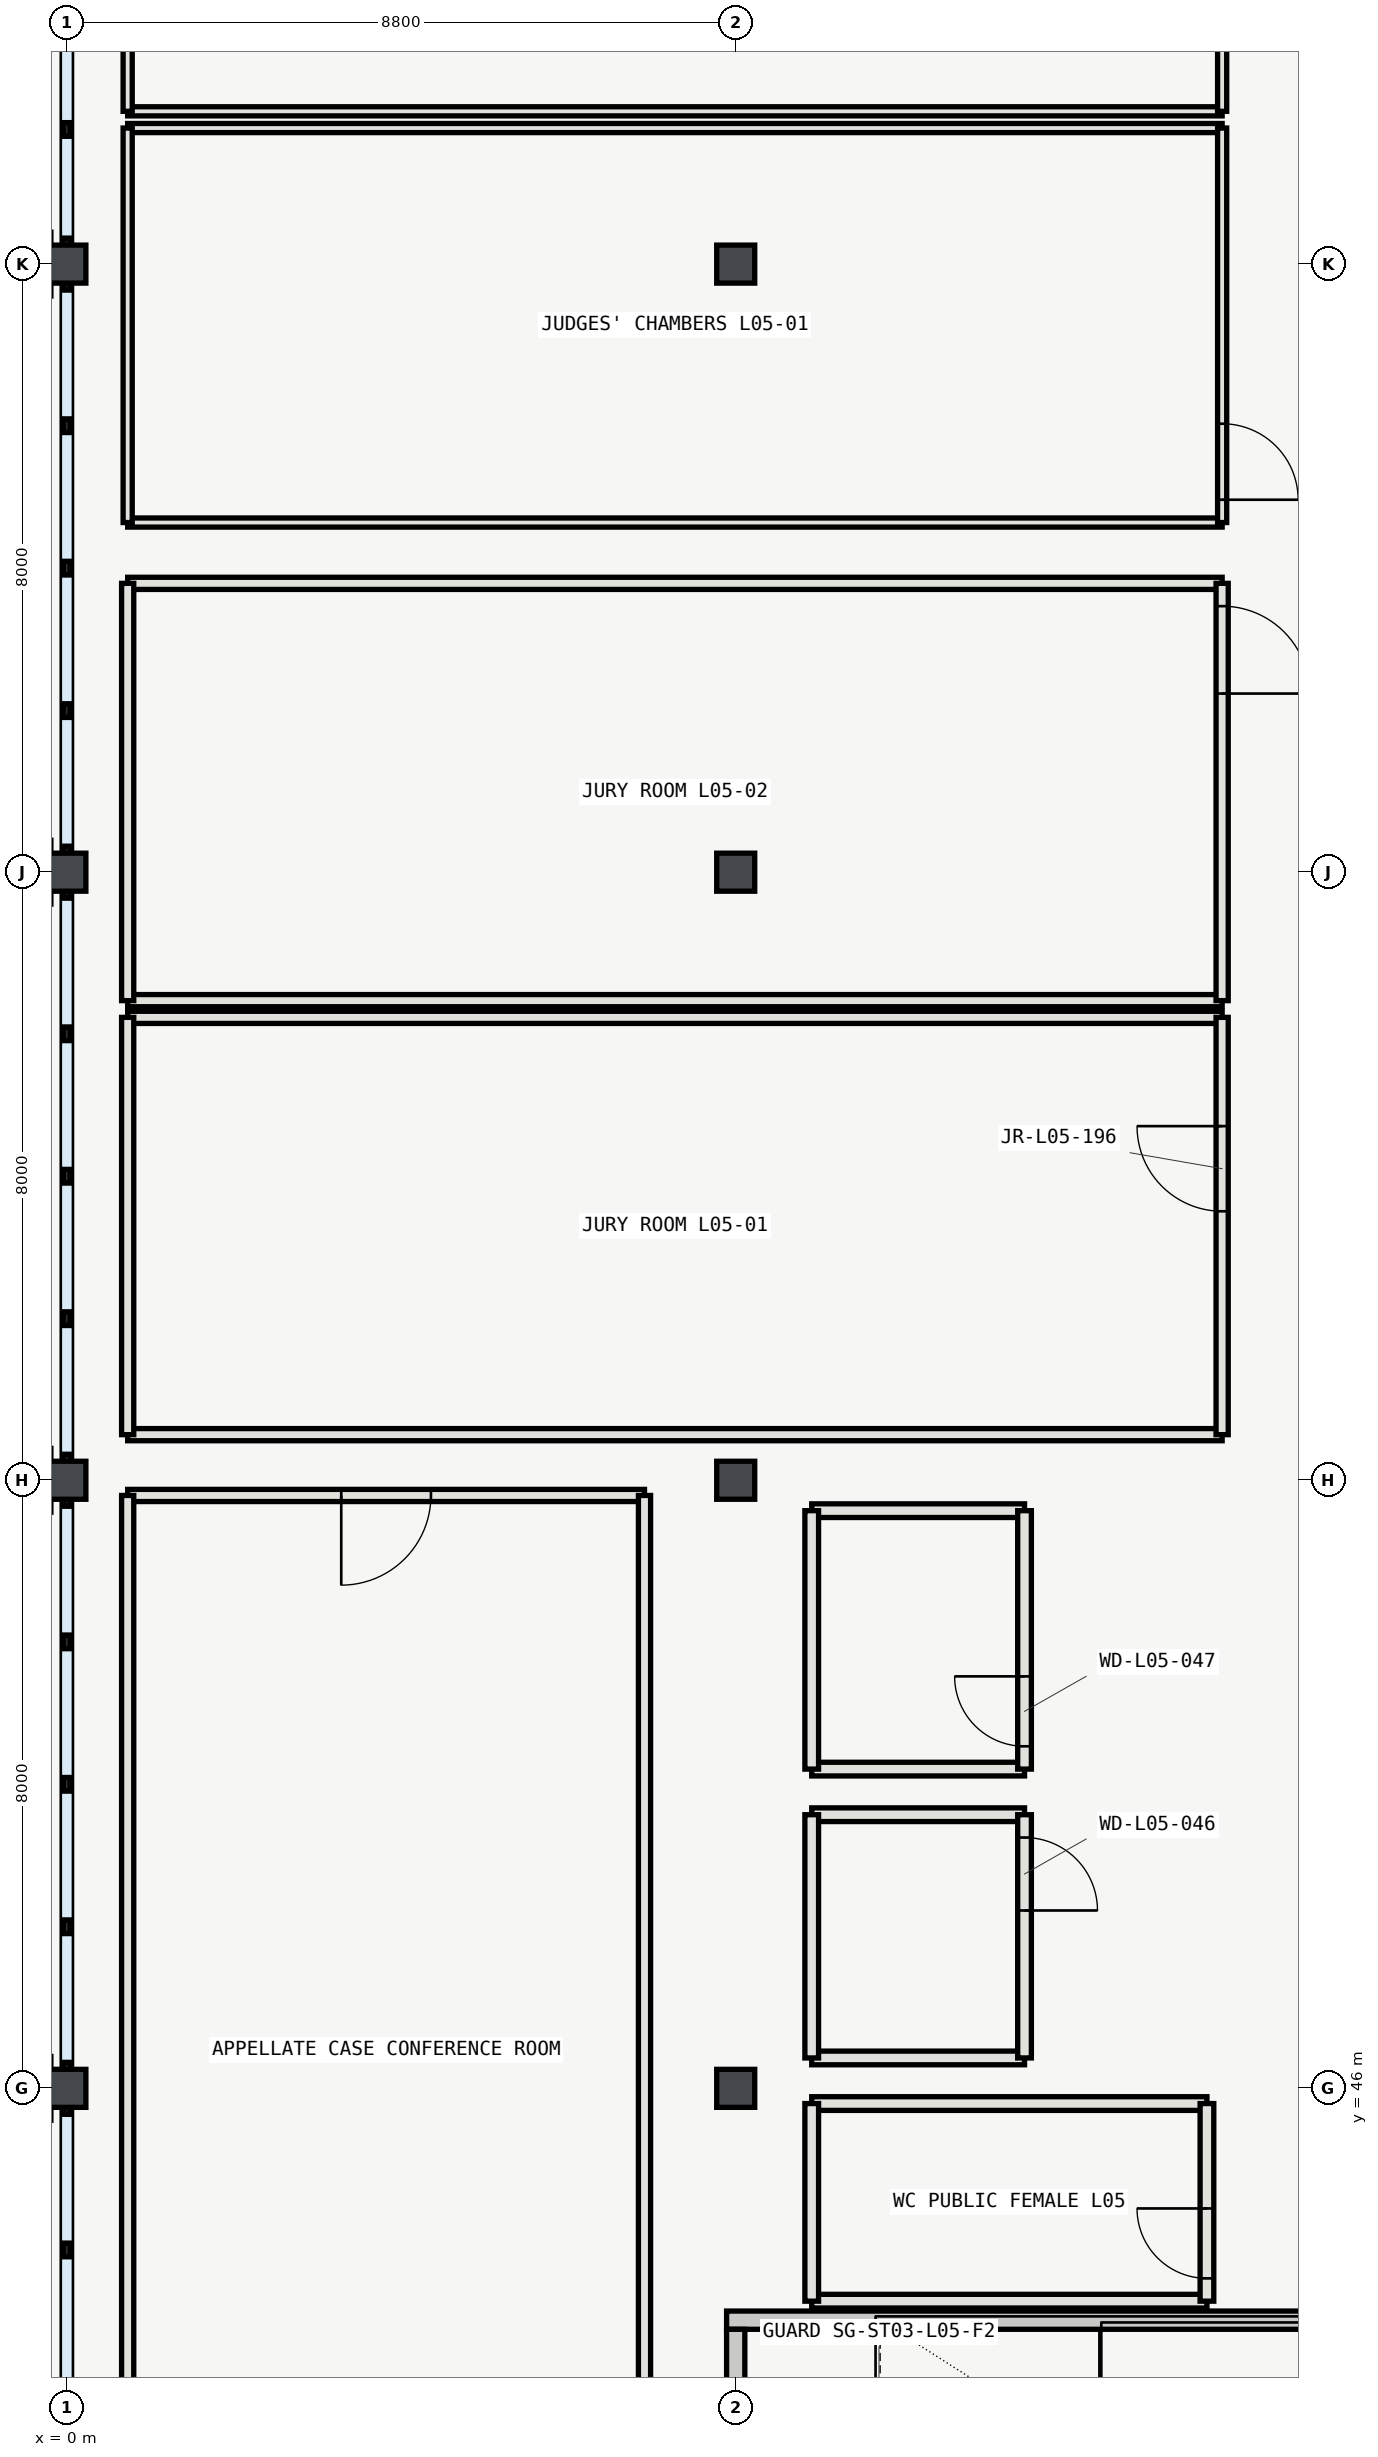
"""IFC4 building model, lengths in metres.
Left out: names, types, materials, properties, quantities, classifications, styles, units other than length and angle.
Written with IfcOpenShell. Run it as: python <this file> out.ifc"""

import sys

from ifc_helpers import new_model, si_unit, direction, frame, frame_2d, origin, origin_2d, place, context, subcontext, project, spatial, rectangle, hollow_rectangle, extrude, element, fill, save


model = new_model("IFC4")
c1 = context("Model", 3, precision=1e-05, world=origin(), true_north=direction((0.0, 1.0)))
c2 = subcontext(c1, "Body", "Model", "MODEL_VIEW")
j1 = project(units=[si_unit("LENGTHUNIT", "METRE"), si_unit("PLANEANGLEUNIT", "RADIAN")], contexts=[c1])
p1 = place(None, origin())
s1 = spatial("IfcSite", under=j1, at=p1, CompositionType="ELEMENT")
p2 = place(p1, origin())
s2 = spatial("IfcBuilding", under=s1, at=p2, CompositionType="ELEMENT")
p3 = place(p2, frame((0.0, 0.0, 24.6)))
s3 = spatial("IfcBuildingStorey", under=s2, at=p3, CompositionType="ELEMENT", Elevation=24.6)
for number, where, z_axis, x_axis in (
    (1, (0.0, 46.0, 0.0), (0.0, 0.0, 1.0), (1.0, 0.0, 0.0)),
    (2, (0.0, 54.0, 0.0), (0.0, 0.0, 1.0), (1.0, 0.0, 0.0)),
    (3, (0.0, 62.0, 0.0), (0.0, 0.0, 1.0), (1.0, 0.0, 0.0)),
    (4, (0.0, 70.0, 0.0), (0.0, 0.0, 1.0), (1.0, 0.0, 0.0)),
    (5, (8.8, 46.0, 0.0), (0.0, 0.0, 1.0), (1.0, 0.0, 0.0)),
    (6, (8.8, 54.0, 0.0), (0.0, 0.0, 1.0), (1.0, 0.0, 0.0)),
    (7, (8.8, 62.0, 0.0), (0.0, 0.0, 1.0), (1.0, 0.0, 0.0)),
    (8, (8.8, 70.0, 0.0), (0.0, 0.0, 1.0), (1.0, 0.0, 0.0)),
):
    element("IfcColumn", number, at=place(p3, frame(where, z_axis=z_axis, x_axis=x_axis)), inside=s3, PredefinedType="COLUMN", context=c2, shape_type="SweptSolid", body=[
        extrude(hollow_rectangle(XDim=0.5, YDim=0.5, WallThickness=0.02, InnerFilletRadius=0.02, OuterFilletRadius=0.04, at=origin_2d()), origin(), (0.0, 0.0, 1.0), 4.2),
    ])
for number, where, z_axis, x_axis in (
    (9, (9.8, 46.4, 0.0), (0.0, 0.0, 1.0), (1.0, 0.0, 0.0)),
    (10, (12.6, 49.6, 0.0), (0.0, 0.0, 1.0), (-1.0, 0.0, 0.0)),
):
    element("IfcWall", number, at=place(p3, frame(where, z_axis=z_axis, x_axis=x_axis)), inside=s3, PredefinedType="PLUMBINGWALL", context=c2, shape_type="SweptSolid", body=[
        extrude(rectangle(XDim=2.8, YDim=0.18, at=frame_2d((1.4, 0.0))), origin(), (0.0, 0.0, 1.0), 3.92),
    ])
p4 = place(p3, frame((9.8, 49.6, 0.0), z_axis=(0.0, 0.0, 1.0), x_axis=(0.0, -1.0, 0.0)))
e11 = element("IfcWall", 11, at=p4, inside=s3, PredefinedType="PLUMBINGWALL", context=c2, shape_type="SweptSolid", body=[
    extrude(rectangle(XDim=3.2, YDim=0.18, at=frame_2d((1.6, 0.0))), origin(), (0.0, 0.0, 1.0), 3.92),
])
p5 = place(p3, frame((12.6, 46.4, 0.0), z_axis=(0.0, 0.0, 1.0), x_axis=(0.0, 1.0, 0.0)))
e12 = element("IfcWall", 12, at=p5, inside=s3, PredefinedType="PLUMBINGWALL", context=c2, shape_type="SweptSolid", body=[
    extrude(rectangle(XDim=3.2, YDim=0.18, at=frame_2d((1.6, 0.0))), origin(), (0.0, 0.0, 1.0), 3.92),
])
p6 = place(p5, frame((1.94, 0.0, 0.0)))
e13 = element("IfcOpeningElement", 13, at=p6, cuts=e12, PredefinedType="OPENING", context=c2, shape_type="SweptSolid", body=[
    extrude(rectangle(XDim=0.96, YDim=2.1, at=frame_2d((0.48, 1.05))), frame((0.0, 0.1, 0.0), z_axis=(0.0, -1.0, 0.0), x_axis=(1.0, 0.0, 0.0)), (0.0, 0.0, 1.0), 0.2),
])
for number, where, z_axis, x_axis in (
    (14, (9.8, 50.2, 0.0), (0.0, 0.0, 1.0), (1.0, 0.0, 0.0)),
    (15, (12.6, 53.6, 0.0), (0.0, 0.0, 1.0), (-1.0, 0.0, 0.0)),
):
    element("IfcWall", number, at=place(p3, frame(where, z_axis=z_axis, x_axis=x_axis)), inside=s3, PredefinedType="PLUMBINGWALL", context=c2, shape_type="SweptSolid", body=[
        extrude(rectangle(XDim=2.8, YDim=0.18, at=frame_2d((1.4, 0.0))), origin(), (0.0, 0.0, 1.0), 3.92),
    ])
p7 = place(p3, frame((9.8, 53.6, 0.0), z_axis=(0.0, 0.0, 1.0), x_axis=(0.0, -1.0, 0.0)))
e16 = element("IfcWall", 16, at=p7, inside=s3, PredefinedType="PLUMBINGWALL", context=c2, shape_type="SweptSolid", body=[
    extrude(rectangle(XDim=3.4, YDim=0.18, at=frame_2d((1.7, 0.0))), origin(), (0.0, 0.0, 1.0), 3.92),
])
p8 = place(p3, frame((12.6, 50.2, 0.0), z_axis=(0.0, 0.0, 1.0), x_axis=(0.0, 1.0, 0.0)))
e17 = element("IfcWall", 17, at=p8, inside=s3, PredefinedType="PLUMBINGWALL", context=c2, shape_type="SweptSolid", body=[
    extrude(rectangle(XDim=3.4, YDim=0.18, at=frame_2d((1.7, 0.0))), origin(), (0.0, 0.0, 1.0), 3.92),
])
p9 = place(p8, frame((0.3, 0.0, 0.0)))
e18 = element("IfcOpeningElement", 18, at=p9, cuts=e17, PredefinedType="OPENING", context=c2, shape_type="SweptSolid", body=[
    extrude(rectangle(XDim=0.92, YDim=2.1, at=frame_2d((0.46, 1.05))), frame((0.0, 0.1, 0.0), z_axis=(0.0, -1.0, 0.0), x_axis=(1.0, 0.0, 0.0)), (0.0, 0.0, 1.0), 0.2),
])
p10 = place(p3, frame((9.8, 43.2, 0.0), z_axis=(0.0, 0.0, 1.0), x_axis=(1.0, 0.0, 0.0)))
e19 = element("IfcWall", 19, at=p10, inside=s3, PredefinedType="PLUMBINGWALL", context=c2, shape_type="SweptSolid", body=[
    extrude(rectangle(XDim=5.2, YDim=0.18, at=frame_2d((2.6, 0.0))), origin(), (0.0, 0.0, 1.0), 3.92),
])
p11 = place(p3, frame((15.0, 45.8, 0.0), z_axis=(0.0, 0.0, 1.0), x_axis=(-1.0, 0.0, 0.0)))
e20 = element("IfcWall", 20, at=p11, inside=s3, PredefinedType="PLUMBINGWALL", context=c2, shape_type="SweptSolid", body=[
    extrude(rectangle(XDim=5.2, YDim=0.18, at=frame_2d((2.6, 0.0))), origin(), (0.0, 0.0, 1.0), 3.636),
])
p12 = place(p3, frame((9.8, 45.8, 0.0), z_axis=(0.0, 0.0, 1.0), x_axis=(0.0, -1.0, 0.0)))
e21 = element("IfcWall", 21, at=p12, inside=s3, PredefinedType="PLUMBINGWALL", context=c2, shape_type="SweptSolid", body=[
    extrude(rectangle(XDim=2.6, YDim=0.18, at=frame_2d((1.3, 0.0))), origin(), (0.0, 0.0, 1.0), 3.92),
])
p13 = place(p3, frame((15.0, 43.2, 0.0), z_axis=(0.0, 0.0, 1.0), x_axis=(0.0, 1.0, 0.0)))
e22 = element("IfcWall", 22, at=p13, inside=s3, PredefinedType="PLUMBINGWALL", context=c2, shape_type="SweptSolid", body=[
    extrude(rectangle(XDim=2.6, YDim=0.18, at=frame_2d((1.3, 0.0))), origin(), (0.0, 0.0, 1.0), 3.92),
])
p14 = place(p13, frame((0.3, 0.0, 0.0)))
e23 = element("IfcOpeningElement", 23, at=p14, cuts=e22, PredefinedType="OPENING", context=c2, shape_type="SweptSolid", body=[
    extrude(rectangle(XDim=0.92, YDim=2.1, at=frame_2d((0.46, 1.05))), frame((0.0, 0.1, 0.0), z_axis=(0.0, -1.0, 0.0), x_axis=(1.0, 0.0, 0.0)), (0.0, 0.0, 1.0), 0.2),
])
for number, where, z_axis, x_axis in (
    (24, (0.8, 54.6, 0.0), (0.0, 0.0, 1.0), (1.0, 0.0, 0.0)),
    (25, (15.2, 60.09, 0.0), (0.0, 0.0, 1.0), (-1.0, 0.0, 0.0)),
):
    element("IfcWall", number, at=place(p3, frame(where, z_axis=z_axis, x_axis=x_axis)), inside=s3, PredefinedType="PARTITIONING", context=c2, shape_type="SweptSolid", body=[
        extrude(rectangle(XDim=14.4, YDim=0.16, at=frame_2d((7.2, 0.0))), origin(), (0.0, 0.0, 1.0), 3.92),
    ])
p15 = place(p3, frame((0.8, 60.09, 0.0), z_axis=(0.0, 0.0, 1.0), x_axis=(0.0, -1.0, 0.0)))
e26 = element("IfcWall", 26, at=p15, inside=s3, PredefinedType="PARTITIONING", context=c2, shape_type="SweptSolid", body=[
    extrude(rectangle(XDim=5.49, YDim=0.16, at=frame_2d((2.745, 0.0))), origin(), (0.0, 0.0, 1.0), 3.92),
])
p16 = place(p3, frame((15.2, 54.6, 0.0), z_axis=(0.0, 0.0, 1.0), x_axis=(0.0, 1.0, 0.0)))
e27 = element("IfcWall", 27, at=p16, inside=s3, PredefinedType="PARTITIONING", context=c2, shape_type="SweptSolid", body=[
    extrude(rectangle(XDim=5.49, YDim=0.16, at=frame_2d((2.745, 0.0))), origin(), (0.0, 0.0, 1.0), 3.92),
])
p17 = place(p16, frame((2.939, 0.0, 0.0)))
e28 = element("IfcOpeningElement", 28, at=p17, cuts=e27, PredefinedType="OPENING", context=c2, shape_type="SweptSolid", body=[
    extrude(rectangle(XDim=1.12, YDim=2.2, at=frame_2d((0.56, 1.1))), frame((0.0, 0.09, 0.0), z_axis=(0.0, -1.0, 0.0), x_axis=(1.0, 0.0, 0.0)), (0.0, 0.0, 1.0), 0.18),
])
for number, where, z_axis, x_axis in (
    (29, (0.8, 60.31, 0.0), (0.0, 0.0, 1.0), (1.0, 0.0, 0.0)),
    (30, (15.2, 65.8, 0.0), (0.0, 0.0, 1.0), (-1.0, 0.0, 0.0)),
):
    element("IfcWall", number, at=place(p3, frame(where, z_axis=z_axis, x_axis=x_axis)), inside=s3, PredefinedType="PARTITIONING", context=c2, shape_type="SweptSolid", body=[
        extrude(rectangle(XDim=14.4, YDim=0.16, at=frame_2d((7.2, 0.0))), origin(), (0.0, 0.0, 1.0), 3.92),
    ])
p18 = place(p3, frame((0.8, 65.8, 0.0), z_axis=(0.0, 0.0, 1.0), x_axis=(0.0, -1.0, 0.0)))
e31 = element("IfcWall", 31, at=p18, inside=s3, PredefinedType="PARTITIONING", context=c2, shape_type="SweptSolid", body=[
    extrude(rectangle(XDim=5.49, YDim=0.16, at=frame_2d((2.745, 0.0))), origin(), (0.0, 0.0, 1.0), 3.92),
])
p19 = place(p3, frame((15.2, 60.31, 0.0), z_axis=(0.0, 0.0, 1.0), x_axis=(0.0, 1.0, 0.0)))
e32 = element("IfcWall", 32, at=p19, inside=s3, PredefinedType="PARTITIONING", context=c2, shape_type="SweptSolid", body=[
    extrude(rectangle(XDim=5.49, YDim=0.16, at=frame_2d((2.745, 0.0))), origin(), (0.0, 0.0, 1.0), 3.92),
])
p20 = place(p19, frame((4.04, 0.0, 0.0)))
e33 = element("IfcOpeningElement", 33, at=p20, cuts=e32, PredefinedType="OPENING", context=c2, shape_type="SweptSolid", body=[
    extrude(rectangle(XDim=1.15, YDim=2.2, at=frame_2d((0.575, 1.1))), frame((0.0, 0.09, 0.0), z_axis=(0.0, -1.0, 0.0), x_axis=(1.0, 0.0, 0.0)), (0.0, 0.0, 1.0), 0.18),
])
for number, where, z_axis, x_axis in (
    (34, (0.8, 66.6, 0.0), (0.0, 0.0, 1.0), (1.0, 0.0, 0.0)),
    (35, (15.2, 71.79, 0.0), (0.0, 0.0, 1.0), (-1.0, 0.0, 0.0)),
):
    element("IfcWall", number, at=place(p3, frame(where, z_axis=z_axis, x_axis=x_axis)), inside=s3, PredefinedType="PARTITIONING", context=c2, shape_type="SweptSolid", body=[
        extrude(rectangle(XDim=14.4, YDim=0.12, at=frame_2d((7.2, 0.0))), origin(), (0.0, 0.0, 1.0), 3.92),
    ])
p21 = place(p3, frame((0.8, 71.79, 0.0), z_axis=(0.0, 0.0, 1.0), x_axis=(0.0, -1.0, 0.0)))
e36 = element("IfcWall", 36, at=p21, inside=s3, PredefinedType="PARTITIONING", context=c2, shape_type="SweptSolid", body=[
    extrude(rectangle(XDim=5.19, YDim=0.12, at=frame_2d((2.595, 0.0))), origin(), (0.0, 0.0, 1.0), 3.92),
])
p22 = place(p3, frame((15.2, 66.6, 0.0), z_axis=(0.0, 0.0, 1.0), x_axis=(0.0, 1.0, 0.0)))
e37 = element("IfcWall", 37, at=p22, inside=s3, PredefinedType="PARTITIONING", context=c2, shape_type="SweptSolid", body=[
    extrude(rectangle(XDim=5.19, YDim=0.12, at=frame_2d((2.595, 0.0))), origin(), (0.0, 0.0, 1.0), 3.92),
])
p23 = place(p22, frame((0.3, 0.0, 0.0)))
e38 = element("IfcOpeningElement", 38, at=p23, cuts=e37, PredefinedType="OPENING", context=c2, shape_type="SweptSolid", body=[
    extrude(rectangle(XDim=1.0, YDim=2.15, at=frame_2d((0.5, 1.075))), frame((0.0, 0.07, 0.0), z_axis=(0.0, -1.0, 0.0), x_axis=(1.0, 0.0, 0.0)), (0.0, 0.0, 1.0), 0.14),
])
p24 = place(p3, frame((0.8, 72.01, 0.0), z_axis=(0.0, 0.0, 1.0), x_axis=(1.0, 0.0, 0.0)))
e39 = element("IfcWall", 39, at=p24, inside=s3, PredefinedType="PARTITIONING", context=c2, shape_type="SweptSolid", body=[
    extrude(rectangle(XDim=14.4, YDim=0.12, at=frame_2d((7.2, 0.0))), origin(), (0.0, 0.0, 1.0), 3.92),
])
p25 = place(p3, frame((0.8, 77.2, 0.0), z_axis=(0.0, 0.0, 1.0), x_axis=(0.0, -1.0, 0.0)))
e40 = element("IfcWall", 40, at=p25, inside=s3, PredefinedType="PARTITIONING", context=c2, shape_type="SweptSolid", body=[
    extrude(rectangle(XDim=5.19, YDim=0.12, at=frame_2d((2.595, 0.0))), origin(), (0.0, 0.0, 1.0), 3.92),
])
p26 = place(p3, frame((15.2, 72.01, 0.0), z_axis=(0.0, 0.0, 1.0), x_axis=(0.0, 1.0, 0.0)))
e41 = element("IfcWall", 41, at=p26, inside=s3, PredefinedType="PARTITIONING", context=c2, shape_type="SweptSolid", body=[
    extrude(rectangle(XDim=5.19, YDim=0.12, at=frame_2d((2.595, 0.0))), origin(), (0.0, 0.0, 1.0), 3.92),
])
p27 = place(p26, frame((1.383, 0.0, 0.0)))
e42 = element("IfcOpeningElement", 42, at=p27, cuts=e41, PredefinedType="OPENING", context=c2, shape_type="SweptSolid", body=[
    extrude(rectangle(XDim=0.98, YDim=2.15, at=frame_2d((0.49, 1.075))), frame((0.0, 0.07, 0.0), z_axis=(0.0, -1.0, 0.0), x_axis=(1.0, 0.0, 0.0)), (0.0, 0.0, 1.0), 0.14),
])
p28 = place(p3, frame((7.6, 53.8, 0.0), z_axis=(0.0, 0.0, 1.0), x_axis=(-1.0, 0.0, 0.0)))
e43 = element("IfcWall", 43, at=p28, inside=s3, PredefinedType="PARTITIONING", context=c2, shape_type="SweptSolid", body=[
    extrude(rectangle(XDim=6.8, YDim=0.16, at=frame_2d((3.4, 0.0))), origin(), (0.0, 0.0, 1.0), 3.546),
])
p29 = place(p28, frame((2.81, 0.0, 0.0)))
e44 = element("IfcOpeningElement", 44, at=p29, cuts=e43, PredefinedType="OPENING", context=c2, shape_type="SweptSolid", body=[
    extrude(rectangle(XDim=1.18, YDim=2.2, at=frame_2d((0.59, 1.1))), frame((0.0, 0.09, 0.0), z_axis=(0.0, -1.0, 0.0), x_axis=(1.0, 0.0, 0.0)), (0.0, 0.0, 1.0), 0.18),
])
for number, where, z_axis, x_axis in (
    (45, (0.8, 53.8, 0.0), (0.0, 0.0, 1.0), (0.0, -1.0, 0.0)),
    (46, (7.6, 39.2, 0.0), (0.0, 0.0, 1.0), (0.0, 1.0, 0.0)),
):
    element("IfcWall", number, at=place(p3, frame(where, z_axis=z_axis, x_axis=x_axis)), inside=s3, PredefinedType="PARTITIONING", context=c2, shape_type="SweptSolid", body=[
        extrude(rectangle(XDim=14.6, YDim=0.16, at=frame_2d((7.3, 0.0))), origin(), (0.0, 0.0, 1.0), 3.92),
    ])
p30 = place(p3, frame((17.72, 42.95, 0.0), z_axis=(0.0, 0.0, 1.0), x_axis=(-1.0, 0.0, 0.0)))
e47 = element("IfcWall", 47, at=p30, inside=s3, PredefinedType="SHEAR", context=c2, shape_type="SweptSolid", body=[
    extrude(rectangle(XDim=9.04, YDim=0.24, at=frame_2d((4.52, 0.0))), origin(), (0.0, 0.0, 1.0), 3.95),
])
p31 = place(p3, frame((8.8, 38.67, 0.0), z_axis=(0.0, 0.0, 1.0), x_axis=(0.0, 1.0, 0.0)))
e48 = element("IfcWall", 48, at=p31, inside=s3, PredefinedType="SHEAR", context=c2, shape_type="SweptSolid", body=[
    extrude(rectangle(XDim=4.16, YDim=0.24, at=frame_2d((2.08, 0.0))), origin(), (0.0, 0.0, 1.0), 3.95),
])
p32 = place(p31, frame((1.405, 0.0, 0.0)))
e49 = element("IfcOpeningElement", 49, at=p32, cuts=e48, PredefinedType="OPENING", context=c2, shape_type="SweptSolid", body=[
    extrude(rectangle(XDim=1.35, YDim=2.2, at=frame_2d((0.675, 1.1))), frame((0.0, 0.13, 0.0), z_axis=(0.0, -1.0, 0.0), x_axis=(1.0, 0.0, 0.0)), (0.0, 0.0, 1.0), 0.26),
])
p33 = place(p6, origin())
e50 = element("IfcDoor", 50, at=p33, inside=s3, OperationType="SINGLE_SWING_LEFT", PredefinedType="DOOR", context=c2, shape_type="SweptSolid", body=[
    extrude(rectangle(XDim=0.96, YDim=2.1, at=frame_2d((0.48, 1.05))), frame((0.0, 0.025, 0.0), z_axis=(0.0, -1.0, 0.0), x_axis=(1.0, 0.0, 0.0)), (0.0, 0.0, 1.0), 0.05),
])
fill(e13, e50)
p34 = place(p9, origin())
e51 = element("IfcDoor", 51, at=p34, inside=s3, OperationType="SINGLE_SWING_RIGHT", PredefinedType="DOOR", context=c2, shape_type="SweptSolid", body=[
    extrude(rectangle(XDim=0.92, YDim=2.1, at=frame_2d((0.46, 1.05))), frame((0.0, 0.025, 0.0), z_axis=(0.0, -1.0, 0.0), x_axis=(1.0, 0.0, 0.0)), (0.0, 0.0, 1.0), 0.05),
])
fill(e18, e51)
p35 = place(p14, origin())
e52 = element("IfcDoor", 52, at=p35, inside=s3, OperationType="SINGLE_SWING_RIGHT", PredefinedType="DOOR", context=c2, shape_type="SweptSolid", body=[
    extrude(rectangle(XDim=0.92, YDim=2.1, at=frame_2d((0.46, 1.05))), frame((0.0, 0.025, 0.0), z_axis=(0.0, -1.0, 0.0), x_axis=(1.0, 0.0, 0.0)), (0.0, 0.0, 1.0), 0.05),
])
fill(e23, e52)
p36 = place(p17, origin())
e53 = element("IfcDoor", 53, at=p36, inside=s3, OperationType="SINGLE_SWING_RIGHT", PredefinedType="DOOR", context=c2, shape_type="SweptSolid", body=[
    extrude(rectangle(XDim=1.12, YDim=2.2, at=frame_2d((0.56, 1.1))), frame((0.0, 0.025, 0.0), z_axis=(0.0, -1.0, 0.0), x_axis=(1.0, 0.0, 0.0)), (0.0, 0.0, 1.0), 0.05),
])
fill(e28, e53)
p37 = place(p20, origin())
e54 = element("IfcDoor", 54, at=p37, inside=s3, OperationType="SINGLE_SWING_LEFT", PredefinedType="DOOR", context=c2, shape_type="SweptSolid", body=[
    extrude(rectangle(XDim=1.15, YDim=2.2, at=frame_2d((0.575, 1.1))), frame((0.0, 0.025, 0.0), z_axis=(0.0, -1.0, 0.0), x_axis=(1.0, 0.0, 0.0)), (0.0, 0.0, 1.0), 0.05),
])
fill(e33, e54)
p38 = place(p23, origin())
e55 = element("IfcDoor", 55, at=p38, inside=s3, OperationType="SINGLE_SWING_LEFT", PredefinedType="DOOR", context=c2, shape_type="SweptSolid", body=[
    extrude(rectangle(XDim=1.0, YDim=2.15, at=frame_2d((0.5, 1.075))), frame((0.0, 0.025, 0.0), z_axis=(0.0, -1.0, 0.0), x_axis=(1.0, 0.0, 0.0)), (0.0, 0.0, 1.0), 0.05),
])
fill(e38, e55)
p39 = place(p29, origin())
e56 = element("IfcDoor", 56, at=p39, inside=s3, OperationType="SINGLE_SWING_RIGHT", PredefinedType="DOOR", context=c2, shape_type="SweptSolid", body=[
    extrude(rectangle(XDim=1.18, YDim=2.2, at=frame_2d((0.59, 1.1))), frame((0.0, 0.025, 0.0), z_axis=(0.0, -1.0, 0.0), x_axis=(1.0, 0.0, 0.0)), (0.0, 0.0, 1.0), 0.05),
])
fill(e44, e56)
save(model, sys.argv[1])
